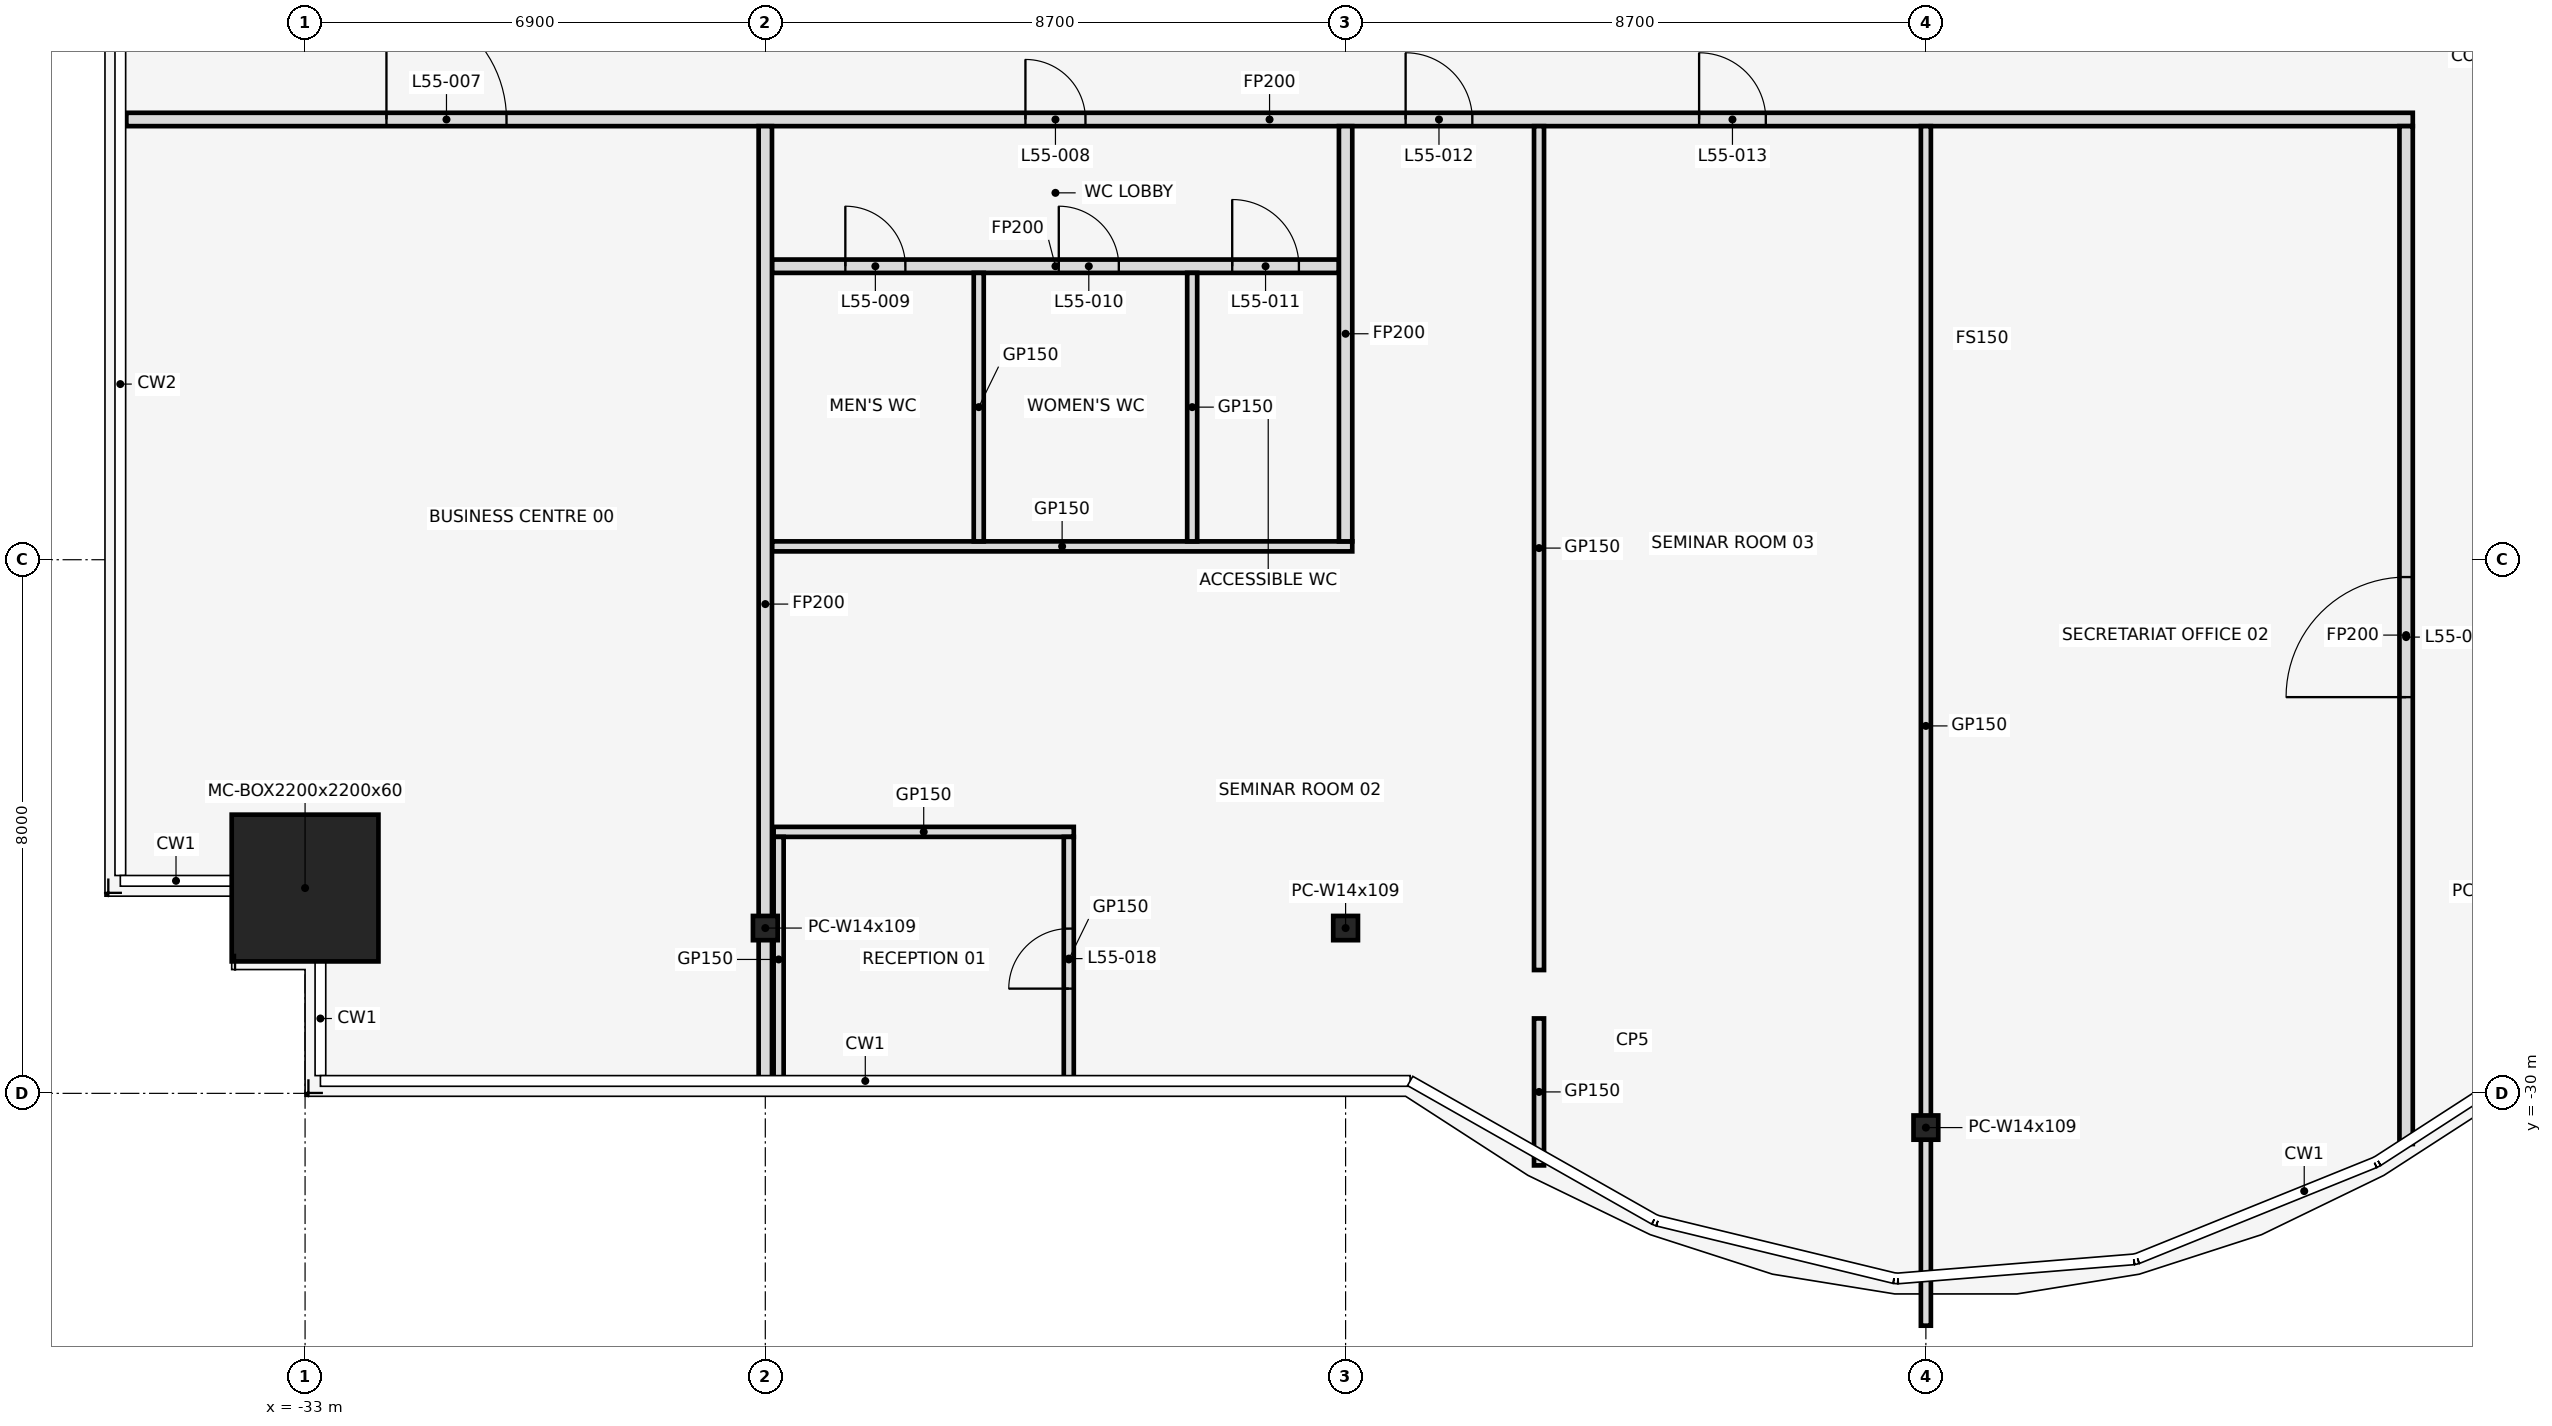
"""IFC4 building model, lengths in metres.
Left out: names, types, materials, properties, quantities, classifications, styles, units other than length and angle.
Written with IfcOpenShell. Run it as: python <this file> out.ifc"""

import sys

from ifc_helpers import new_model, si_unit, direction, frame, frame_2d, origin, origin_2d, place, context, subcontext, project, spatial, rectangle, hollow_rectangle, i_section, extrude, element, fill, save


model = new_model("IFC4")
c1 = context("Model", 3, precision=1e-05, world=origin(), true_north=direction((0.0, 1.0)))
c2 = subcontext(c1, "Body", "Model", "MODEL_VIEW")
j1 = project(units=[si_unit("LENGTHUNIT", "METRE"), si_unit("PLANEANGLEUNIT", "RADIAN")], contexts=[c1])
p1 = place(None, origin())
s1 = spatial("IfcSite", under=j1, at=p1, CompositionType="ELEMENT")
p2 = place(p1, origin())
s2 = spatial("IfcBuilding", under=s1, at=p2, CompositionType="ELEMENT")
p3 = place(p2, frame((0.0, 0.0, 245.6)))
s3 = spatial("IfcBuildingStorey", under=s2, at=p3, CompositionType="ELEMENT", Elevation=245.6)
p4 = place(p3, frame((-33.0, -26.922, 0.0), z_axis=(0.0, 0.0, 1.0), x_axis=(1.0, 0.0, 0.0)))
e1 = element("IfcColumn", 1, at=p4, inside=s3, PredefinedType="COLUMN", context=c2, shape_type="SweptSolid", body=[
    extrude(hollow_rectangle(XDim=2.2, YDim=2.2, WallThickness=0.06, at=origin_2d()), origin(), (0.0, 0.0, 1.0), 4.2),
])
for number, where, z_axis, x_axis in (
    (2, (-26.1, -27.522, 0.0), (0.0, 0.0, 1.0), (1.0, 0.0, 0.0)),
    (3, (-17.4, -27.522, 0.0), (0.0, 0.0, 1.0), (1.0, 0.0, 0.0)),
    (4, (-8.7, -30.513, 0.0), (0.0, 0.0, 1.0), (1.0, 0.0, 0.0)),
):
    element("IfcColumn", number, at=place(p3, frame(where, z_axis=z_axis, x_axis=x_axis)), inside=s3, PredefinedType="COLUMN", context=c2, shape_type="SweptSolid", body=[
        extrude(i_section(OverallWidth=0.371, OverallDepth=0.363, WebThickness=0.013, FlangeThickness=0.022, at=origin_2d()), origin(), (0.0, 0.0, 1.0), 4.2),
    ])
p5 = place(p3, frame((-25.975, -26.08, 0.0), z_axis=(0.0, 0.0, 1.0), x_axis=(1.0, 0.0, 0.0)))
e5 = element("IfcWall", 5, at=p5, inside=s3, PredefinedType="PARTITIONING", context=c2, shape_type="SweptSolid", body=[
    extrude(rectangle(XDim=4.5, YDim=0.15, at=frame_2d((2.25, 0.0))), origin(), (0.0, 0.0, 1.0), 3.039),
])
p6 = place(p3, frame((-26.0, -21.8, 0.0), z_axis=(0.0, 0.0, 1.0), x_axis=(1.0, 0.0, 0.0)))
e6 = element("IfcWall", 6, at=p6, inside=s3, PredefinedType="PARTITIONING", context=c2, shape_type="SweptSolid", body=[
    extrude(rectangle(XDim=8.7, YDim=0.15, at=frame_2d((4.35, 0.0))), origin(), (0.0, 0.0, 1.0), 3.039),
])
p7 = place(p3, frame((-26.0, -17.6, 0.0), z_axis=(0.0, 0.0, 1.0), x_axis=(1.0, 0.0, 0.0)))
e7 = element("IfcWall", 7, at=p7, inside=s3, PredefinedType="PARTITIONING", context=c2, shape_type="SweptSolid", body=[
    extrude(rectangle(XDim=8.5, YDim=0.2, at=frame_2d((4.25, 0.0))), origin(), (0.0, 0.0, 1.0), 3.039),
])
p8 = place(p7, frame((1.1, 0.0, 0.0)))
e8 = element("IfcOpeningElement", 8, at=p8, cuts=e7, PredefinedType="OPENING", context=c2, shape_type="SweptSolid", body=[
    extrude(rectangle(XDim=0.9, YDim=2.1, at=frame_2d((0.45, 1.05))), frame((0.0, 0.112, 0.0), z_axis=(0.0, -1.0, 0.0), x_axis=(1.0, 0.0, 0.0)), (0.0, 0.0, 1.0), 0.224),
])
p9 = place(p7, frame((4.3, 0.0, 0.0)))
e9 = element("IfcOpeningElement", 9, at=p9, cuts=e7, PredefinedType="OPENING", context=c2, shape_type="SweptSolid", body=[
    extrude(rectangle(XDim=0.9, YDim=2.1, at=frame_2d((0.45, 1.05))), frame((0.0, 0.112, 0.0), z_axis=(0.0, -1.0, 0.0), x_axis=(1.0, 0.0, 0.0)), (0.0, 0.0, 1.0), 0.224),
])
p10 = place(p7, frame((6.9, 0.0, 0.0)))
e10 = element("IfcOpeningElement", 10, at=p10, cuts=e7, PredefinedType="OPENING", context=c2, shape_type="SweptSolid", body=[
    extrude(rectangle(XDim=1.0, YDim=2.1, at=frame_2d((0.5, 1.05))), frame((0.0, 0.112, 0.0), z_axis=(0.0, -1.0, 0.0), x_axis=(1.0, 0.0, 0.0)), (0.0, 0.0, 1.0), 0.224),
])
p11 = place(p3, frame((-35.68, -15.4, 0.0), z_axis=(0.0, 0.0, 1.0), x_axis=(1.0, 0.0, 0.0)))
e11 = element("IfcWall", 11, at=p11, inside=s3, PredefinedType="PARTITIONING", context=c2, shape_type="SweptSolid", body=[
    extrude(rectangle(XDim=34.28, YDim=0.2, at=frame_2d((17.14, 0.0))), origin(), (0.0, 0.0, 1.0), 3.039),
])
p12 = place(p11, frame((3.9, 0.0, 0.0)))
e12 = element("IfcOpeningElement", 12, at=p12, cuts=e11, PredefinedType="OPENING", context=c2, shape_type="SweptSolid", body=[
    extrude(rectangle(XDim=1.8, YDim=2.1, at=frame_2d((0.9, 1.05))), frame((0.0, 0.112, 0.0), z_axis=(0.0, -1.0, 0.0), x_axis=(1.0, 0.0, 0.0)), (0.0, 0.0, 1.0), 0.224),
])
p13 = place(p11, frame((13.48, 0.0, 0.0)))
e13 = element("IfcOpeningElement", 13, at=p13, cuts=e11, PredefinedType="OPENING", context=c2, shape_type="SweptSolid", body=[
    extrude(rectangle(XDim=0.9, YDim=2.1, at=frame_2d((0.45, 1.05))), frame((0.0, 0.112, 0.0), z_axis=(0.0, -1.0, 0.0), x_axis=(1.0, 0.0, 0.0)), (0.0, 0.0, 1.0), 0.224),
])
p14 = place(p11, frame((19.18, 0.0, 0.0)))
e14 = element("IfcOpeningElement", 14, at=p14, cuts=e11, PredefinedType="OPENING", context=c2, shape_type="SweptSolid", body=[
    extrude(rectangle(XDim=1.0, YDim=2.1, at=frame_2d((0.5, 1.05))), frame((0.0, 0.112, 0.0), z_axis=(0.0, -1.0, 0.0), x_axis=(1.0, 0.0, 0.0)), (0.0, 0.0, 1.0), 0.224),
])
p15 = place(p11, frame((23.58, 0.0, 0.0)))
e15 = element("IfcOpeningElement", 15, at=p15, cuts=e11, PredefinedType="OPENING", context=c2, shape_type="SweptSolid", body=[
    extrude(rectangle(XDim=1.0, YDim=2.1, at=frame_2d((0.5, 1.05))), frame((0.0, 0.112, 0.0), z_axis=(0.0, -1.0, 0.0), x_axis=(1.0, 0.0, 0.0)), (0.0, 0.0, 1.0), 0.224),
])
p16 = place(p3, frame((-26.1, -29.83, 0.0), z_axis=(0.0, 0.0, 1.0), x_axis=(0.0, 1.0, 0.0)))
e16 = element("IfcWall", 16, at=p16, inside=s3, PredefinedType="PARTITIONING", context=c2, shape_type="SweptSolid", body=[
    extrude(rectangle(XDim=14.33, YDim=0.2, at=frame_2d((7.165, 0.0))), origin(), (0.0, 0.0, 1.0), 3.039),
])
p17 = place(p3, frame((-25.9, -29.83, 0.0), z_axis=(0.0, 0.0, 1.0), x_axis=(0.0, 1.0, 0.0)))
e17 = element("IfcWall", 17, at=p17, inside=s3, PredefinedType="PARTITIONING", context=c2, shape_type="SweptSolid", body=[
    extrude(rectangle(XDim=3.675, YDim=0.15, at=frame_2d((1.837, 0.0))), origin(), (0.0, 0.0, 1.0), 3.039),
])
p18 = place(p3, frame((-22.9, -21.725, 0.0), z_axis=(0.0, 0.0, 1.0), x_axis=(0.0, 1.0, 0.0)))
e18 = element("IfcWall", 18, at=p18, inside=s3, PredefinedType="PARTITIONING", context=c2, shape_type="SweptSolid", body=[
    extrude(rectangle(XDim=4.025, YDim=0.15, at=frame_2d((2.013, 0.0))), origin(), (0.0, 0.0, 1.0), 3.039),
])
p19 = place(p3, frame((-21.55, -29.83, 0.0), z_axis=(0.0, 0.0, 1.0), x_axis=(0.0, 1.0, 0.0)))
e19 = element("IfcWall", 19, at=p19, inside=s3, PredefinedType="PARTITIONING", context=c2, shape_type="SweptSolid", body=[
    extrude(rectangle(XDim=3.675, YDim=0.15, at=frame_2d((1.837, 0.0))), origin(), (0.0, 0.0, 1.0), 3.039),
])
p20 = place(p19, frame((1.4, 0.0, 0.0)))
e20 = element("IfcOpeningElement", 20, at=p20, cuts=e19, PredefinedType="OPENING", context=c2, shape_type="SweptSolid", body=[
    extrude(rectangle(XDim=0.9, YDim=2.1, at=frame_2d((0.45, 1.05))), frame((0.0, 0.087, 0.0), z_axis=(0.0, -1.0, 0.0), x_axis=(1.0, 0.0, 0.0)), (0.0, 0.0, 1.0), 0.174),
])
p21 = place(p3, frame((-19.7, -21.725, 0.0), z_axis=(0.0, 0.0, 1.0), x_axis=(0.0, 1.0, 0.0)))
e21 = element("IfcWall", 21, at=p21, inside=s3, PredefinedType="PARTITIONING", context=c2, shape_type="SweptSolid", body=[
    extrude(rectangle(XDim=4.025, YDim=0.15, at=frame_2d((2.013, 0.0))), origin(), (0.0, 0.0, 1.0), 3.039),
])
p22 = place(p3, frame((-17.4, -21.725, 0.0), z_axis=(0.0, 0.0, 1.0), x_axis=(0.0, 1.0, 0.0)))
e22 = element("IfcWall", 22, at=p22, inside=s3, PredefinedType="PARTITIONING", context=c2, shape_type="SweptSolid", body=[
    extrude(rectangle(XDim=6.225, YDim=0.2, at=frame_2d((3.113, 0.0))), origin(), (0.0, 0.0, 1.0), 3.039),
])
p23 = place(p3, frame((-14.5, -31.08, 0.0), z_axis=(0.0, 0.0, 1.0), x_axis=(0.0, 1.0, 0.0)))
e23 = element("IfcWall", 23, at=p23, inside=s3, PredefinedType="PARTITIONING", context=c2, shape_type="SweptSolid", body=[
    extrude(rectangle(XDim=2.203, YDim=0.15, at=frame_2d((1.102, 0.0))), origin(), (0.0, 0.0, 1.0), 3.039),
])
p24 = place(p3, frame((-14.5, -28.151, 0.0), z_axis=(0.0, 0.0, 1.0), x_axis=(0.0, 1.0, 0.0)))
e24 = element("IfcWall", 24, at=p24, inside=s3, PredefinedType="PARTITIONING", context=c2, shape_type="SweptSolid", body=[
    extrude(rectangle(XDim=12.651, YDim=0.15, at=frame_2d((6.326, 0.0))), origin(), (0.0, 0.0, 1.0), 3.039),
])
p25 = place(p3, frame((-8.7, -33.483, 0.0), z_axis=(0.0, 0.0, 1.0), x_axis=(0.0, 1.0, 0.0)))
e25 = element("IfcWall", 25, at=p25, inside=s3, PredefinedType="PARTITIONING", context=c2, shape_type="SweptSolid", body=[
    extrude(rectangle(XDim=17.983, YDim=0.15, at=frame_2d((8.992, 0.0))), origin(), (0.0, 0.0, 1.0), 3.039),
])
p26 = place(p3, frame((-1.5, -30.76, 0.0), z_axis=(0.0, 0.0, 1.0), x_axis=(0.0, 1.0, 0.0)))
e26 = element("IfcWall", 26, at=p26, inside=s3, PredefinedType="PARTITIONING", context=c2, shape_type="SweptSolid", body=[
    extrude(rectangle(XDim=15.26, YDim=0.2, at=frame_2d((7.63, 0.0))), origin(), (0.0, 0.0, 1.0), 3.039),
])
p27 = place(p26, frame((6.7, 0.0, 0.0)))
e27 = element("IfcOpeningElement", 27, at=p27, cuts=e26, PredefinedType="OPENING", context=c2, shape_type="SweptSolid", body=[
    extrude(rectangle(XDim=1.8, YDim=2.1, at=frame_2d((0.9, 1.05))), frame((0.0, 0.112, 0.0), z_axis=(0.0, -1.0, 0.0), x_axis=(1.0, 0.0, 0.0)), (0.0, 0.0, 1.0), 0.224),
])
p28 = place(p12, origin())
e28 = element("IfcDoor", 28, at=p28, inside=s3, OperationType="SINGLE_SWING_LEFT", PredefinedType="DOOR", context=c2, shape_type="SweptSolid", body=[
    extrude(rectangle(XDim=1.8, YDim=2.1, at=frame_2d((0.9, 1.05))), frame((0.0, 0.025, 0.0), z_axis=(0.0, -1.0, 0.0), x_axis=(1.0, 0.0, 0.0)), (0.0, 0.0, 1.0), 0.05),
])
fill(e12, e28)
p29 = place(p13, frame((0.9, 0.0, 0.0), z_axis=(0.0, 0.0, 1.0), x_axis=(-1.0, 0.0, 0.0)))
e29 = element("IfcDoor", 29, at=p29, inside=s3, OperationType="SINGLE_SWING_RIGHT", PredefinedType="DOOR", context=c2, shape_type="SweptSolid", body=[
    extrude(rectangle(XDim=0.9, YDim=2.1, at=frame_2d((0.45, 1.05))), frame((0.0, 0.025, 0.0), z_axis=(0.0, -1.0, 0.0), x_axis=(1.0, 0.0, 0.0)), (0.0, 0.0, 1.0), 0.05),
])
fill(e13, e29)
p30 = place(p8, frame((0.9, 0.0, 0.0), z_axis=(0.0, 0.0, 1.0), x_axis=(-1.0, 0.0, 0.0)))
e30 = element("IfcDoor", 30, at=p30, inside=s3, OperationType="SINGLE_SWING_RIGHT", PredefinedType="DOOR", context=c2, shape_type="SweptSolid", body=[
    extrude(rectangle(XDim=0.9, YDim=2.1, at=frame_2d((0.45, 1.05))), frame((0.0, 0.025, 0.0), z_axis=(0.0, -1.0, 0.0), x_axis=(1.0, 0.0, 0.0)), (0.0, 0.0, 1.0), 0.05),
])
fill(e8, e30)
p31 = place(p9, frame((0.9, 0.0, 0.0), z_axis=(0.0, 0.0, 1.0), x_axis=(-1.0, 0.0, 0.0)))
e31 = element("IfcDoor", 31, at=p31, inside=s3, OperationType="SINGLE_SWING_LEFT", PredefinedType="DOOR", context=c2, shape_type="SweptSolid", body=[
    extrude(rectangle(XDim=0.9, YDim=2.1, at=frame_2d((0.45, 1.05))), frame((0.0, 0.025, 0.0), z_axis=(0.0, -1.0, 0.0), x_axis=(1.0, 0.0, 0.0)), (0.0, 0.0, 1.0), 0.05),
])
fill(e9, e31)
p32 = place(p10, frame((1.0, 0.0, 0.0), z_axis=(0.0, 0.0, 1.0), x_axis=(-1.0, 0.0, 0.0)))
e32 = element("IfcDoor", 32, at=p32, inside=s3, OperationType="SINGLE_SWING_RIGHT", PredefinedType="DOOR", context=c2, shape_type="SweptSolid", body=[
    extrude(rectangle(XDim=1.0, YDim=2.1, at=frame_2d((0.5, 1.05))), frame((0.0, 0.025, 0.0), z_axis=(0.0, -1.0, 0.0), x_axis=(1.0, 0.0, 0.0)), (0.0, 0.0, 1.0), 0.05),
])
fill(e10, e32)
p33 = place(p14, frame((1.0, 0.0, 0.0), z_axis=(0.0, 0.0, 1.0), x_axis=(-1.0, 0.0, 0.0)))
e33 = element("IfcDoor", 33, at=p33, inside=s3, OperationType="SINGLE_SWING_RIGHT", PredefinedType="DOOR", context=c2, shape_type="SweptSolid", body=[
    extrude(rectangle(XDim=1.0, YDim=2.1, at=frame_2d((0.5, 1.05))), frame((0.0, 0.025, 0.0), z_axis=(0.0, -1.0, 0.0), x_axis=(1.0, 0.0, 0.0)), (0.0, 0.0, 1.0), 0.05),
])
fill(e14, e33)
p34 = place(p15, frame((1.0, 0.0, 0.0), z_axis=(0.0, 0.0, 1.0), x_axis=(-1.0, 0.0, 0.0)))
e34 = element("IfcDoor", 34, at=p34, inside=s3, OperationType="SINGLE_SWING_LEFT", PredefinedType="DOOR", context=c2, shape_type="SweptSolid", body=[
    extrude(rectangle(XDim=1.0, YDim=2.1, at=frame_2d((0.5, 1.05))), frame((0.0, 0.025, 0.0), z_axis=(0.0, -1.0, 0.0), x_axis=(1.0, 0.0, 0.0)), (0.0, 0.0, 1.0), 0.05),
])
fill(e15, e34)
p35 = place(p27, origin())
e35 = element("IfcDoor", 35, at=p35, inside=s3, OperationType="SINGLE_SWING_LEFT", PredefinedType="DOOR", context=c2, shape_type="SweptSolid", body=[
    extrude(rectangle(XDim=1.8, YDim=2.1, at=frame_2d((0.9, 1.05))), frame((0.0, 0.025, 0.0), z_axis=(0.0, -1.0, 0.0), x_axis=(1.0, 0.0, 0.0)), (0.0, 0.0, 1.0), 0.05),
])
fill(e27, e35)
p36 = place(p20, origin())
e36 = element("IfcDoor", 36, at=p36, inside=s3, OperationType="SINGLE_SWING_RIGHT", PredefinedType="DOOR", context=c2, shape_type="SweptSolid", body=[
    extrude(rectangle(XDim=0.9, YDim=2.1, at=frame_2d((0.45, 1.05))), frame((0.0, 0.025, 0.0), z_axis=(0.0, -1.0, 0.0), x_axis=(1.0, 0.0, 0.0)), (0.0, 0.0, 1.0), 0.05),
])
fill(e20, e36)
save(model, sys.argv[1])
